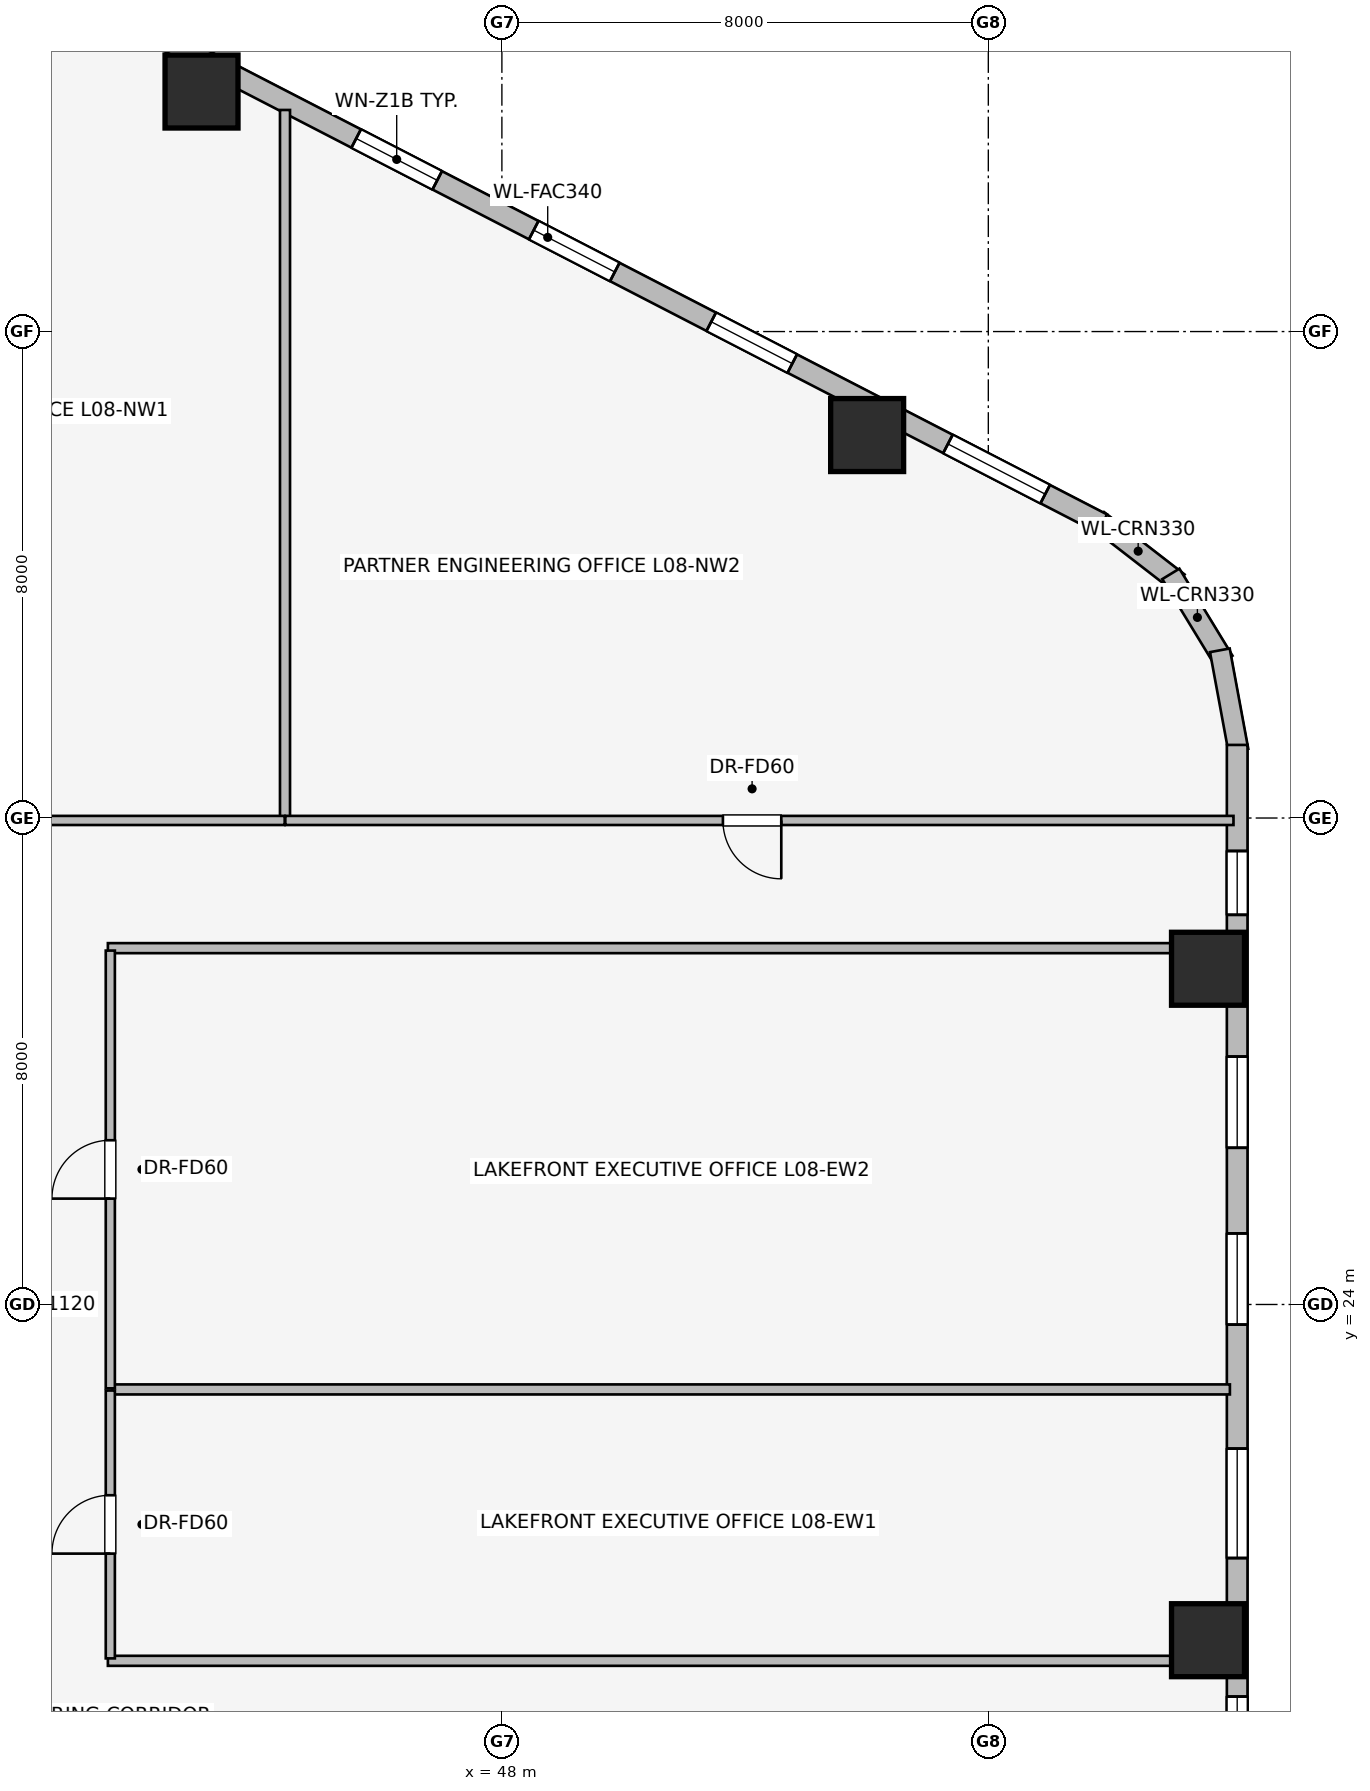
"""IFC4 building model, lengths in metres.
Left out: names, types, materials, properties, quantities, classifications, styles, units other than length and angle.
Written with IfcOpenShell. Run it as: python <this file> out.ifc"""

import sys

from ifc_helpers import new_model, si_unit, direction, frame, frame_2d, origin, origin_2d, place, context, subcontext, project, spatial, rectangle, extrude, element, fill, save


model = new_model("IFC4")
c1 = context("Model", 3, precision=1e-05, world=origin(), true_north=direction((0.0, 1.0)))
c2 = subcontext(c1, "Body", "Model", "MODEL_VIEW")
j1 = project(units=[si_unit("LENGTHUNIT", "METRE"), si_unit("PLANEANGLEUNIT", "RADIAN")], contexts=[c1])
p1 = place(None, origin())
s1 = spatial("IfcSite", under=j1, at=p1, CompositionType="ELEMENT")
p2 = place(p1, origin())
s2 = spatial("IfcBuilding", under=s1, at=p2, CompositionType="ELEMENT")
p3 = place(p2, frame((0.0, 0.0, 34.3)))
s3 = spatial("IfcBuildingStorey", under=s2, at=p3, CompositionType="ELEMENT", Elevation=34.3)
for number, where, z_axis, x_axis in (
    (1, (54.007, 38.298, 0.0), (0.0, 0.0, 1.0), (1.0, 0.0, 0.0)),
    (2, (43.06, 43.947, 0.0), (0.0, 0.0, 1.0), (1.0, 0.0, 0.0)),
    (3, (59.613, 18.479, 0.0), (0.0, 0.0, 1.0), (1.0, 0.0, 0.0)),
    (4, (59.613, 29.521, 0.0), (0.0, 0.0, 1.0), (1.0, 0.0, 0.0)),
):
    element("IfcColumn", number, at=place(p3, frame(where, z_axis=z_axis, x_axis=x_axis)), inside=s3, PredefinedType="COLUMN", context=c2, shape_type="SweptSolid", body=[
        extrude(rectangle(XDim=1.2, YDim=1.2, at=origin_2d()), origin(), (0.0, 0.0, 1.0), 3.65),
    ])
p4 = place(p3, frame((57.802, 36.901, 0.0), z_axis=(0.0, 0.0, 1.0), x_axis=(0.790691856293, -0.61221433207, 0.0)))
e5 = element("IfcWall", 5, at=p4, inside=s3, PredefinedType="STANDARD", context=c2, shape_type="SweptSolid", body=[
    extrude(rectangle(XDim=1.676, YDim=0.33, at=frame_2d((0.838, 0.0))), origin(), (0.0, 0.0, 1.0), 3.39),
])
p5 = place(p3, frame((59.002, 36.015, 0.0), z_axis=(0.0, 0.0, 1.0), x_axis=(0.520584129191, -0.853810379671, 0.0)))
e6 = element("IfcWall", 6, at=p5, inside=s3, PredefinedType="STANDARD", context=c2, shape_type="SweptSolid", body=[
    extrude(rectangle(XDim=1.677, YDim=0.33, at=frame_2d((0.838, 0.0))), origin(), (0.0, 0.0, 1.0), 3.39),
])
p6 = place(p3, frame((59.808, 34.758, 0.0), z_axis=(0.0, 0.0, 1.0), x_axis=(0.181714143354, -0.983351397063, 0.0)))
e7 = element("IfcWall", 7, at=p6, inside=s3, PredefinedType="STANDARD", context=c2, shape_type="SweptSolid", body=[
    extrude(rectangle(XDim=1.678, YDim=0.33, at=frame_2d((0.839, 0.0))), origin(), (0.0, 0.0, 1.0), 3.39),
])
p7 = place(p3, frame((39.631, 46.257, 0.0), z_axis=(0.0, 0.0, 1.0), x_axis=(0.888634413993, -0.458616264721, 0.0)))
e8 = element("IfcWall", 8, at=p7, inside=s3, PredefinedType="STANDARD", context=c2, shape_type="SweptSolid", body=[
    extrude(rectangle(XDim=20.531, YDim=0.34, at=frame_2d((10.266, 0.0))), origin(), (0.0, 0.0, 1.0), 2.684),
])
p8 = place(p7, frame((1.058, 0.0, 0.75)))
e9 = element("IfcOpeningElement", 9, at=p8, cuts=e8, PredefinedType="OPENING", context=c2, shape_type="SweptSolid", body=[
    extrude(rectangle(XDim=1.8, YDim=1.5, at=frame_2d((0.9, 0.75))), frame((0.0, 0.18, 0.0), z_axis=(0.0, -1.0, 0.0), x_axis=(1.0, 0.0, 0.0)), (0.0, 0.0, 1.0), 0.36),
])
p9 = place(p7, frame((6.721, 0.0, 0.75)))
e10 = element("IfcOpeningElement", 10, at=p9, cuts=e8, PredefinedType="OPENING", context=c2, shape_type="SweptSolid", body=[
    extrude(rectangle(XDim=1.5, YDim=1.5, at=frame_2d((0.75, 0.75))), frame((0.0, 0.18, 0.0), z_axis=(0.0, -1.0, 0.0), x_axis=(1.0, 0.0, 0.0)), (0.0, 0.0, 1.0), 0.36),
])
p10 = place(p7, frame((10.007, 0.0, 0.75)))
e11 = element("IfcOpeningElement", 11, at=p10, cuts=e8, PredefinedType="OPENING", context=c2, shape_type="SweptSolid", body=[
    extrude(rectangle(XDim=1.5, YDim=1.5, at=frame_2d((0.75, 0.75))), frame((0.0, 0.18, 0.0), z_axis=(0.0, -1.0, 0.0), x_axis=(1.0, 0.0, 0.0)), (0.0, 0.0, 1.0), 0.36),
])
p11 = place(p7, frame((13.292, 0.0, 0.75)))
e12 = element("IfcOpeningElement", 12, at=p11, cuts=e8, PredefinedType="OPENING", context=c2, shape_type="SweptSolid", body=[
    extrude(rectangle(XDim=1.5, YDim=1.5, at=frame_2d((0.75, 0.75))), frame((0.0, 0.18, 0.0), z_axis=(0.0, -1.0, 0.0), x_axis=(1.0, 0.0, 0.0)), (0.0, 0.0, 1.0), 0.36),
])
p12 = place(p7, frame((17.673, 0.0, 0.75)))
e13 = element("IfcOpeningElement", 13, at=p12, cuts=e8, PredefinedType="OPENING", context=c2, shape_type="SweptSolid", body=[
    extrude(rectangle(XDim=1.8, YDim=1.5, at=frame_2d((0.9, 0.75))), frame((0.0, 0.18, 0.0), z_axis=(0.0, -1.0, 0.0), x_axis=(1.0, 0.0, 0.0)), (0.0, 0.0, 1.0), 0.36),
])
p13 = place(p3, frame((60.093, 33.202, 0.0), z_axis=(0.0, 0.0, 1.0), x_axis=(0.0, -1.0, 0.0)))
e14 = element("IfcWall", 14, at=p13, inside=s3, PredefinedType="STANDARD", context=c2, shape_type="SweptSolid", body=[
    extrude(rectangle(XDim=18.404, YDim=0.34, at=frame_2d((9.202, 0.0))), origin(), (0.0, 0.0, 1.0), 2.684),
])
p14 = place(p13, frame((1.744, 0.0, 0.75)))
e15 = element("IfcOpeningElement", 15, at=p14, cuts=e14, PredefinedType="OPENING", context=c2, shape_type="SweptSolid", body=[
    extrude(rectangle(XDim=1.05, YDim=1.4, at=frame_2d((0.525, 0.7))), frame((0.0, 0.18, 0.0), z_axis=(0.0, -1.0, 0.0), x_axis=(1.0, 0.0, 0.0)), (0.0, 0.0, 1.0), 0.36),
])
p15 = place(p13, frame((5.125, 0.0, 0.75)))
e16 = element("IfcOpeningElement", 16, at=p15, cuts=e14, PredefinedType="OPENING", context=c2, shape_type="SweptSolid", body=[
    extrude(rectangle(XDim=1.5, YDim=1.5, at=frame_2d((0.75, 0.75))), frame((0.0, 0.18, 0.0), z_axis=(0.0, -1.0, 0.0), x_axis=(1.0, 0.0, 0.0)), (0.0, 0.0, 1.0), 0.36),
])
p16 = place(p13, frame((8.033, 0.0, 0.75)))
e17 = element("IfcOpeningElement", 17, at=p16, cuts=e14, PredefinedType="OPENING", context=c2, shape_type="SweptSolid", body=[
    extrude(rectangle(XDim=1.5, YDim=1.5, at=frame_2d((0.75, 0.75))), frame((0.0, 0.18, 0.0), z_axis=(0.0, -1.0, 0.0), x_axis=(1.0, 0.0, 0.0)), (0.0, 0.0, 1.0), 0.36),
])
p17 = place(p13, frame((11.572, 0.0, 0.75)))
e18 = element("IfcOpeningElement", 18, at=p17, cuts=e14, PredefinedType="OPENING", context=c2, shape_type="SweptSolid", body=[
    extrude(rectangle(XDim=1.8, YDim=1.5, at=frame_2d((0.9, 0.75))), frame((0.0, 0.18, 0.0), z_axis=(0.0, -1.0, 0.0), x_axis=(1.0, 0.0, 0.0)), (0.0, 0.0, 1.0), 0.36),
])
p18 = place(p13, frame((15.65, 0.0, 0.75)))
e19 = element("IfcOpeningElement", 19, at=p18, cuts=e14, PredefinedType="OPENING", context=c2, shape_type="SweptSolid", body=[
    extrude(rectangle(XDim=1.05, YDim=1.4, at=frame_2d((0.525, 0.7))), frame((0.0, 0.18, 0.0), z_axis=(0.0, -1.0, 0.0), x_axis=(1.0, 0.0, 0.0)), (0.0, 0.0, 1.0), 0.36),
])
p19 = place(p3, frame((44.433, 31.97, 0.0), z_axis=(0.0, 0.0, 1.0), x_axis=(0.0, 1.0, 0.0)))
e20 = element("IfcWall", 20, at=p19, inside=s3, PredefinedType="PARTITIONING", context=c2, shape_type="SweptSolid", body=[
    extrude(rectangle(XDim=11.674, YDim=0.165, at=frame_2d((5.837, 0.0))), origin(), (0.0, 0.0, 1.0), 3.39),
])
p20 = place(p3, frame((44.428, 31.96, 0.0), z_axis=(0.0, 0.0, 1.0), x_axis=(-1.0, 0.0, 0.0)))
e21 = element("IfcWall", 21, at=p20, inside=s3, PredefinedType="PARTITIONING", context=c2, shape_type="SweptSolid", body=[
    extrude(rectangle(XDim=10.138, YDim=0.15, at=frame_2d((5.069, 0.0))), origin(), (0.0, 0.0, 1.0), 3.39),
])
p21 = place(p20, frame((4.47, 0.0, 0.0)))
e22 = element("IfcOpeningElement", 22, at=p21, cuts=e21, PredefinedType="OPENING", context=c2, shape_type="SweptSolid", body=[
    extrude(rectangle(XDim=0.96, YDim=2.0, at=frame_2d((0.48, 1.0))), frame((0.0, 0.085, 0.0), z_axis=(0.0, -1.0, 0.0), x_axis=(1.0, 0.0, 0.0)), (0.0, 0.0, 1.0), 0.17),
])
p22 = place(p3, frame((60.032, 31.96, 0.0), z_axis=(0.0, 0.0, 1.0), x_axis=(-1.0, 0.0, 0.0)))
e23 = element("IfcWall", 23, at=p22, inside=s3, PredefinedType="PARTITIONING", context=c2, shape_type="SweptSolid", body=[
    extrude(rectangle(XDim=15.594, YDim=0.15, at=frame_2d((7.797, 0.0))), origin(), (0.0, 0.0, 1.0), 3.39),
])
p23 = place(p22, frame((7.437, 0.0, 0.0)))
e24 = element("IfcOpeningElement", 24, at=p23, cuts=e23, PredefinedType="OPENING", context=c2, shape_type="SweptSolid", body=[
    extrude(rectangle(XDim=0.96, YDim=2.0, at=frame_2d((0.48, 1.0))), frame((0.0, 0.085, 0.0), z_axis=(0.0, -1.0, 0.0), x_axis=(1.0, 0.0, 0.0)), (0.0, 0.0, 1.0), 0.17),
])
for number, where, z_axis, x_axis in (
    (25, (41.52, 18.14, 0.0), (0.0, 0.0, 1.0), (1.0, 0.0, 0.0)),
    (26, (41.52, 29.86, 0.0), (0.0, 0.0, 1.0), (1.0, 0.0, 0.0)),
):
    element("IfcWall", number, at=place(p3, frame(where, z_axis=z_axis, x_axis=x_axis)), inside=s3, PredefinedType="PARTITIONING", context=c2, shape_type="SweptSolid", body=[
        extrude(rectangle(XDim=18.453, YDim=0.165, at=frame_2d((9.227, 0.0))), origin(), (0.0, 0.0, 1.0), 2.03),
    ])
p24 = place(p3, frame((41.59, 22.603, 0.0), z_axis=(0.0, 0.0, 1.0), x_axis=(1.0, 0.0, 0.0)))
e27 = element("IfcWall", 27, at=p24, inside=s3, PredefinedType="PARTITIONING", context=c2, shape_type="SweptSolid", body=[
    extrude(rectangle(XDim=18.383, YDim=0.165, at=frame_2d((9.191, 0.0))), origin(), (0.0, 0.0, 1.0), 3.39),
])
p25 = place(p3, frame((41.56, 18.18, 0.0), z_axis=(0.0, 0.0, 1.0), x_axis=(0.0, 1.0, 0.0)))
e28 = element("IfcWall", 28, at=p25, inside=s3, PredefinedType="PARTITIONING", context=c2, shape_type="SweptSolid", body=[
    extrude(rectangle(XDim=4.405, YDim=0.15, at=frame_2d((2.203, 0.0))), origin(), (0.0, 0.0, 1.0), 3.39),
])
p26 = place(p25, frame((1.723, 0.0, 0.0)))
e29 = element("IfcOpeningElement", 29, at=p26, cuts=e28, PredefinedType="OPENING", context=c2, shape_type="SweptSolid", body=[
    extrude(rectangle(XDim=0.96, YDim=2.0, at=frame_2d((0.48, 1.0))), frame((0.0, 0.085, 0.0), z_axis=(0.0, -1.0, 0.0), x_axis=(1.0, 0.0, 0.0)), (0.0, 0.0, 1.0), 0.17),
])
p27 = place(p3, frame((41.56, 22.621, 0.0), z_axis=(0.0, 0.0, 1.0), x_axis=(0.0, 1.0, 0.0)))
e30 = element("IfcWall", 30, at=p27, inside=s3, PredefinedType="PARTITIONING", context=c2, shape_type="SweptSolid", body=[
    extrude(rectangle(XDim=7.199, YDim=0.15, at=frame_2d((3.6, 0.0))), origin(), (0.0, 0.0, 1.0), 3.39),
])
p28 = place(p27, frame((3.12, 0.0, 0.0)))
e31 = element("IfcOpeningElement", 31, at=p28, cuts=e30, PredefinedType="OPENING", context=c2, shape_type="SweptSolid", body=[
    extrude(rectangle(XDim=0.96, YDim=2.0, at=frame_2d((0.48, 1.0))), frame((0.0, 0.085, 0.0), z_axis=(0.0, -1.0, 0.0), x_axis=(1.0, 0.0, 0.0)), (0.0, 0.0, 1.0), 0.17),
])
p29 = place(p9, origin())
e32 = element("IfcWindow", 32, at=p29, inside=s3, PartitioningType="SINGLE_PANEL", PredefinedType="WINDOW", context=c2, shape_type="SweptSolid", body=[
    extrude(rectangle(XDim=1.5, YDim=1.5, at=frame_2d((0.75, 0.75))), frame((0.0, 0.03, 0.0), z_axis=(0.0, -1.0, 0.0), x_axis=(1.0, 0.0, 0.0)), (0.0, 0.0, 1.0), 0.06),
])
fill(e10, e32)
p30 = place(p10, origin())
e33 = element("IfcWindow", 33, at=p30, inside=s3, PartitioningType="SINGLE_PANEL", PredefinedType="WINDOW", context=c2, shape_type="SweptSolid", body=[
    extrude(rectangle(XDim=1.5, YDim=1.5, at=frame_2d((0.75, 0.75))), frame((0.0, 0.03, 0.0), z_axis=(0.0, -1.0, 0.0), x_axis=(1.0, 0.0, 0.0)), (0.0, 0.0, 1.0), 0.06),
])
fill(e11, e33)
p31 = place(p11, origin())
e34 = element("IfcWindow", 34, at=p31, inside=s3, PartitioningType="SINGLE_PANEL", PredefinedType="WINDOW", context=c2, shape_type="SweptSolid", body=[
    extrude(rectangle(XDim=1.5, YDim=1.5, at=frame_2d((0.75, 0.75))), frame((0.0, 0.03, 0.0), z_axis=(0.0, -1.0, 0.0), x_axis=(1.0, 0.0, 0.0)), (0.0, 0.0, 1.0), 0.06),
])
fill(e12, e34)
p32 = place(p12, origin())
e35 = element("IfcWindow", 35, at=p32, inside=s3, PartitioningType="SINGLE_PANEL", PredefinedType="WINDOW", context=c2, shape_type="SweptSolid", body=[
    extrude(rectangle(XDim=1.8, YDim=1.5, at=frame_2d((0.9, 0.75))), frame((0.0, 0.03, 0.0), z_axis=(0.0, -1.0, 0.0), x_axis=(1.0, 0.0, 0.0)), (0.0, 0.0, 1.0), 0.06),
])
fill(e13, e35)
p33 = place(p14, origin())
e36 = element("IfcWindow", 36, at=p33, inside=s3, PartitioningType="SINGLE_PANEL", PredefinedType="WINDOW", context=c2, shape_type="SweptSolid", body=[
    extrude(rectangle(XDim=1.05, YDim=1.4, at=frame_2d((0.525, 0.7))), frame((0.0, 0.03, 0.0), z_axis=(0.0, -1.0, 0.0), x_axis=(1.0, 0.0, 0.0)), (0.0, 0.0, 1.0), 0.06),
])
fill(e15, e36)
p34 = place(p15, origin())
e37 = element("IfcWindow", 37, at=p34, inside=s3, PartitioningType="SINGLE_PANEL", PredefinedType="WINDOW", context=c2, shape_type="SweptSolid", body=[
    extrude(rectangle(XDim=1.5, YDim=1.5, at=frame_2d((0.75, 0.75))), frame((0.0, 0.03, 0.0), z_axis=(0.0, -1.0, 0.0), x_axis=(1.0, 0.0, 0.0)), (0.0, 0.0, 1.0), 0.06),
])
fill(e16, e37)
p35 = place(p16, origin())
e38 = element("IfcWindow", 38, at=p35, inside=s3, PartitioningType="SINGLE_PANEL", PredefinedType="WINDOW", context=c2, shape_type="SweptSolid", body=[
    extrude(rectangle(XDim=1.5, YDim=1.5, at=frame_2d((0.75, 0.75))), frame((0.0, 0.03, 0.0), z_axis=(0.0, -1.0, 0.0), x_axis=(1.0, 0.0, 0.0)), (0.0, 0.0, 1.0), 0.06),
])
fill(e17, e38)
p36 = place(p17, origin())
e39 = element("IfcWindow", 39, at=p36, inside=s3, PartitioningType="SINGLE_PANEL", PredefinedType="WINDOW", context=c2, shape_type="SweptSolid", body=[
    extrude(rectangle(XDim=1.8, YDim=1.5, at=frame_2d((0.9, 0.75))), frame((0.0, 0.03, 0.0), z_axis=(0.0, -1.0, 0.0), x_axis=(1.0, 0.0, 0.0)), (0.0, 0.0, 1.0), 0.06),
])
fill(e18, e39)
p37 = place(p18, origin())
e40 = element("IfcWindow", 40, at=p37, inside=s3, PartitioningType="SINGLE_PANEL", PredefinedType="WINDOW", context=c2, shape_type="SweptSolid", body=[
    extrude(rectangle(XDim=1.05, YDim=1.4, at=frame_2d((0.525, 0.7))), frame((0.0, 0.03, 0.0), z_axis=(0.0, -1.0, 0.0), x_axis=(1.0, 0.0, 0.0)), (0.0, 0.0, 1.0), 0.06),
])
fill(e19, e40)
p38 = place(p23, origin())
e41 = element("IfcDoor", 41, at=p38, inside=s3, OperationType="SINGLE_SWING_LEFT", PredefinedType="DOOR", context=c2, shape_type="SweptSolid", body=[
    extrude(rectangle(XDim=0.96, YDim=2.0, at=frame_2d((0.48, 1.0))), frame((0.0, 0.025, 0.0), z_axis=(0.0, -1.0, 0.0), x_axis=(1.0, 0.0, 0.0)), (0.0, 0.0, 1.0), 0.05),
])
fill(e24, e41)
p39 = place(p26, origin())
e42 = element("IfcDoor", 42, at=p39, inside=s3, OperationType="SINGLE_SWING_LEFT", PredefinedType="DOOR", context=c2, shape_type="SweptSolid", body=[
    extrude(rectangle(XDim=0.96, YDim=2.0, at=frame_2d((0.48, 1.0))), frame((0.0, 0.025, 0.0), z_axis=(0.0, -1.0, 0.0), x_axis=(1.0, 0.0, 0.0)), (0.0, 0.0, 1.0), 0.05),
])
fill(e29, e42)
p40 = place(p28, origin())
e43 = element("IfcDoor", 43, at=p40, inside=s3, OperationType="SINGLE_SWING_LEFT", PredefinedType="DOOR", context=c2, shape_type="SweptSolid", body=[
    extrude(rectangle(XDim=0.96, YDim=2.0, at=frame_2d((0.48, 1.0))), frame((0.0, 0.025, 0.0), z_axis=(0.0, -1.0, 0.0), x_axis=(1.0, 0.0, 0.0)), (0.0, 0.0, 1.0), 0.05),
])
fill(e31, e43)
save(model, sys.argv[1])
